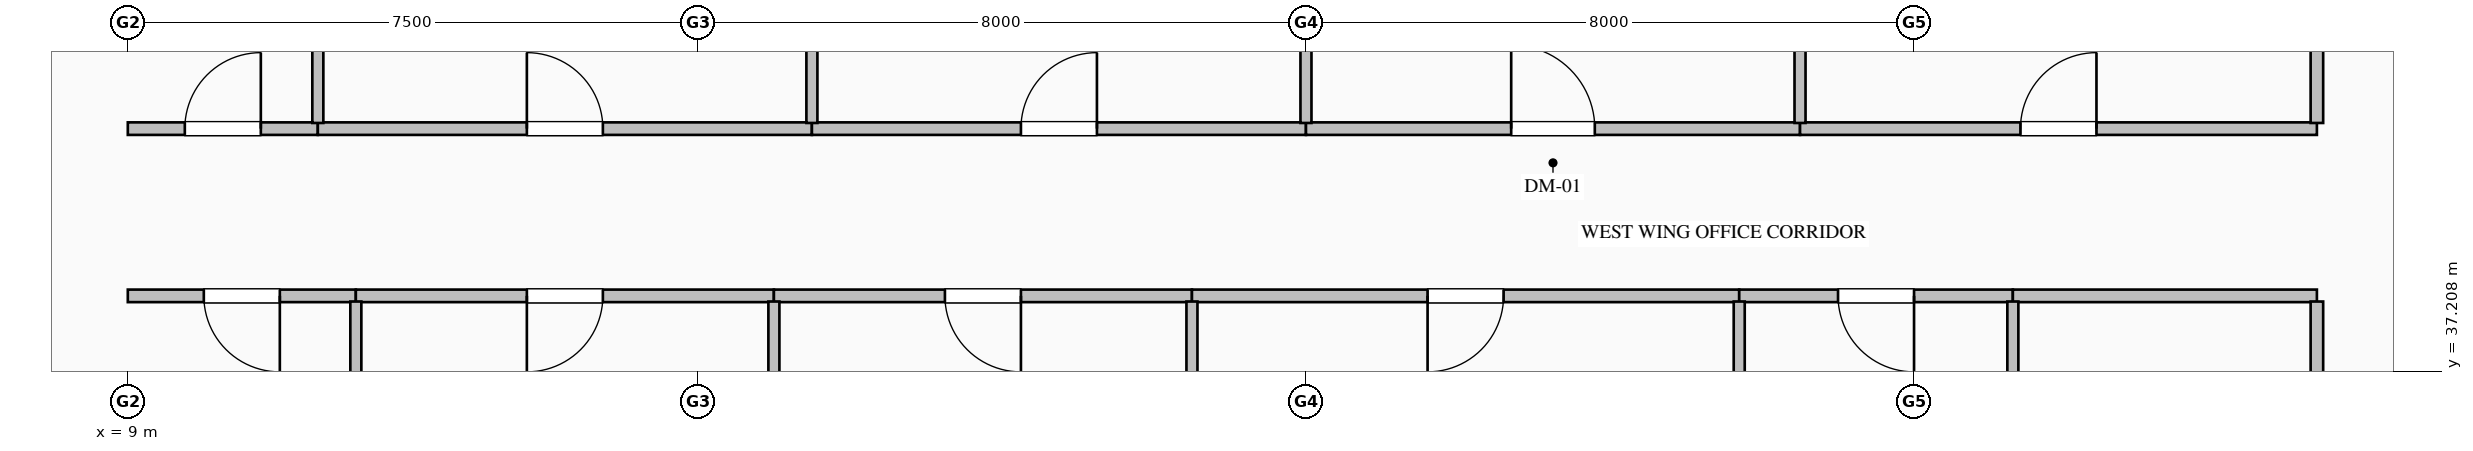
"""IFC4 building model, lengths in metres.
Left out: names, types, materials, properties, quantities, classifications, styles, units other than length and angle.
Written with IfcOpenShell. Run it as: python <this file> out.ifc"""

import sys

from ifc_helpers import new_model, si_unit, direction, frame, frame_2d, origin, place, context, subcontext, project, spatial, rectangle, extrude, element, fill, save


model = new_model("IFC4")
c1 = context("Model", 3, precision=1e-05, world=origin(), true_north=direction((0.0, 1.0)))
c2 = subcontext(c1, "Body", "Model", "MODEL_VIEW")
j1 = project(units=[si_unit("LENGTHUNIT", "METRE"), si_unit("PLANEANGLEUNIT", "RADIAN")], contexts=[c1])
p1 = place(None, origin())
s1 = spatial("IfcSite", under=j1, at=p1, CompositionType="ELEMENT")
p2 = place(p1, origin())
s2 = spatial("IfcBuilding", under=s1, at=p2, CompositionType="ELEMENT")
p3 = place(p2, frame((0.0, 0.0, 92.2)))
s3 = spatial("IfcBuildingStorey", under=s2, at=p3, CompositionType="ELEMENT", Elevation=92.2)
p4 = place(p3, frame((9.0, 40.4, 0.0), z_axis=(0.0, 0.0, 1.0), x_axis=(1.0, 0.0, 0.0)))
e1 = element("IfcWall", 1, at=p4, inside=s3, PredefinedType="PARTITIONING", context=c2, shape_type="SweptSolid", body=[
    extrude(rectangle(XDim=2.5, YDim=0.165, at=frame_2d((1.25, 0.0))), origin(), (0.0, 0.0, 1.0), 3.75),
])
p5 = place(p4, frame((0.75, 0.0, 0.0)))
e2 = element("IfcOpeningElement", 2, at=p5, cuts=e1, PredefinedType="OPENING", context=c2, shape_type="SweptSolid", body=[
    extrude(rectangle(XDim=1.0, YDim=2.15, at=frame_2d((0.5, 1.075))), frame((0.0, 0.093, 0.0), z_axis=(0.0, -1.0, 0.0), x_axis=(1.0, 0.0, 0.0)), (0.0, 0.0, 1.0), 0.185),
])
p6 = place(p3, frame((11.5, 40.4, 0.0), z_axis=(0.0, 0.0, 1.0), x_axis=(1.0, 0.0, 0.0)))
e3 = element("IfcWall", 3, at=p6, inside=s3, PredefinedType="PARTITIONING", context=c2, shape_type="SweptSolid", body=[
    extrude(rectangle(XDim=6.5, YDim=0.165, at=frame_2d((3.25, 0.0))), origin(), (0.0, 0.0, 1.0), 3.75),
])
p7 = place(p6, frame((2.75, 0.0, 0.0)))
e4 = element("IfcOpeningElement", 4, at=p7, cuts=e3, PredefinedType="OPENING", context=c2, shape_type="SweptSolid", body=[
    extrude(rectangle(XDim=1.0, YDim=2.15, at=frame_2d((0.5, 1.075))), frame((0.0, 0.093, 0.0), z_axis=(0.0, -1.0, 0.0), x_axis=(1.0, 0.0, 0.0)), (0.0, 0.0, 1.0), 0.185),
])
p8 = place(p3, frame((18.0, 40.4, 0.0), z_axis=(0.0, 0.0, 1.0), x_axis=(1.0, 0.0, 0.0)))
e5 = element("IfcWall", 5, at=p8, inside=s3, PredefinedType="PARTITIONING", context=c2, shape_type="SweptSolid", body=[
    extrude(rectangle(XDim=6.5, YDim=0.165, at=frame_2d((3.25, 0.0))), origin(), (0.0, 0.0, 1.0), 3.75),
])
p9 = place(p8, frame((2.75, 0.0, 0.0)))
e6 = element("IfcOpeningElement", 6, at=p9, cuts=e5, PredefinedType="OPENING", context=c2, shape_type="SweptSolid", body=[
    extrude(rectangle(XDim=1.0, YDim=2.15, at=frame_2d((0.5, 1.075))), frame((0.0, 0.093, 0.0), z_axis=(0.0, -1.0, 0.0), x_axis=(1.0, 0.0, 0.0)), (0.0, 0.0, 1.0), 0.185),
])
p10 = place(p3, frame((24.5, 40.4, 0.0), z_axis=(0.0, 0.0, 1.0), x_axis=(1.0, 0.0, 0.0)))
e7 = element("IfcWall", 7, at=p10, inside=s3, PredefinedType="PARTITIONING", context=c2, shape_type="SweptSolid", body=[
    extrude(rectangle(XDim=6.5, YDim=0.165, at=frame_2d((3.25, 0.0))), origin(), (0.0, 0.0, 1.0), 3.75),
])
p11 = place(p10, frame((2.7, 0.0, 0.0)))
e8 = element("IfcOpeningElement", 8, at=p11, cuts=e7, PredefinedType="OPENING", context=c2, shape_type="SweptSolid", body=[
    extrude(rectangle(XDim=1.1, YDim=2.2, at=frame_2d((0.55, 1.1))), frame((0.0, 0.093, 0.0), z_axis=(0.0, -1.0, 0.0), x_axis=(1.0, 0.0, 0.0)), (0.0, 0.0, 1.0), 0.185),
])
p12 = place(p3, frame((31.0, 40.4, 0.0), z_axis=(0.0, 0.0, 1.0), x_axis=(1.0, 0.0, 0.0)))
e9 = element("IfcWall", 9, at=p12, inside=s3, PredefinedType="PARTITIONING", context=c2, shape_type="SweptSolid", body=[
    extrude(rectangle(XDim=6.8, YDim=0.165, at=frame_2d((3.4, 0.0))), origin(), (0.0, 0.0, 1.0), 3.75),
])
p13 = place(p12, frame((2.9, 0.0, 0.0)))
e10 = element("IfcOpeningElement", 10, at=p13, cuts=e9, PredefinedType="OPENING", context=c2, shape_type="SweptSolid", body=[
    extrude(rectangle(XDim=1.0, YDim=2.15, at=frame_2d((0.5, 1.075))), frame((0.0, 0.093, 0.0), z_axis=(0.0, -1.0, 0.0), x_axis=(1.0, 0.0, 0.0)), (0.0, 0.0, 1.0), 0.185),
])
p14 = place(p3, frame((12.0, 38.2, 0.0), z_axis=(0.0, 0.0, 1.0), x_axis=(-1.0, 0.0, 0.0)))
e11 = element("IfcWall", 11, at=p14, inside=s3, PredefinedType="PARTITIONING", context=c2, shape_type="SweptSolid", body=[
    extrude(rectangle(XDim=3.0, YDim=0.165, at=frame_2d((1.5, 0.0))), origin(), (0.0, 0.0, 1.0), 3.75),
])
p15 = place(p14, frame((1.0, 0.0, 0.0)))
e12 = element("IfcOpeningElement", 12, at=p15, cuts=e11, PredefinedType="OPENING", context=c2, shape_type="SweptSolid", body=[
    extrude(rectangle(XDim=1.0, YDim=2.15, at=frame_2d((0.5, 1.075))), frame((0.0, 0.093, 0.0), z_axis=(0.0, -1.0, 0.0), x_axis=(1.0, 0.0, 0.0)), (0.0, 0.0, 1.0), 0.185),
])
p16 = place(p3, frame((17.5, 38.2, 0.0), z_axis=(0.0, 0.0, 1.0), x_axis=(-1.0, 0.0, 0.0)))
e13 = element("IfcWall", 13, at=p16, inside=s3, PredefinedType="PARTITIONING", context=c2, shape_type="SweptSolid", body=[
    extrude(rectangle(XDim=5.5, YDim=0.165, at=frame_2d((2.75, 0.0))), origin(), (0.0, 0.0, 1.0), 3.75),
])
p17 = place(p16, frame((2.25, 0.0, 0.0)))
e14 = element("IfcOpeningElement", 14, at=p17, cuts=e13, PredefinedType="OPENING", context=c2, shape_type="SweptSolid", body=[
    extrude(rectangle(XDim=1.0, YDim=2.15, at=frame_2d((0.5, 1.075))), frame((0.0, 0.093, 0.0), z_axis=(0.0, -1.0, 0.0), x_axis=(1.0, 0.0, 0.0)), (0.0, 0.0, 1.0), 0.185),
])
p18 = place(p3, frame((23.0, 38.2, 0.0), z_axis=(0.0, 0.0, 1.0), x_axis=(-1.0, 0.0, 0.0)))
e15 = element("IfcWall", 15, at=p18, inside=s3, PredefinedType="PARTITIONING", context=c2, shape_type="SweptSolid", body=[
    extrude(rectangle(XDim=5.5, YDim=0.165, at=frame_2d((2.75, 0.0))), origin(), (0.0, 0.0, 1.0), 3.75),
])
p19 = place(p18, frame((2.25, 0.0, 0.0)))
e16 = element("IfcOpeningElement", 16, at=p19, cuts=e15, PredefinedType="OPENING", context=c2, shape_type="SweptSolid", body=[
    extrude(rectangle(XDim=1.0, YDim=2.15, at=frame_2d((0.5, 1.075))), frame((0.0, 0.093, 0.0), z_axis=(0.0, -1.0, 0.0), x_axis=(1.0, 0.0, 0.0)), (0.0, 0.0, 1.0), 0.185),
])
p20 = place(p3, frame((30.2, 38.2, 0.0), z_axis=(0.0, 0.0, 1.0), x_axis=(-1.0, 0.0, 0.0)))
e17 = element("IfcWall", 17, at=p20, inside=s3, PredefinedType="PARTITIONING", context=c2, shape_type="SweptSolid", body=[
    extrude(rectangle(XDim=7.2, YDim=0.165, at=frame_2d((3.6, 0.0))), origin(), (0.0, 0.0, 1.0), 3.75),
])
p21 = place(p20, frame((3.1, 0.0, 0.0)))
e18 = element("IfcOpeningElement", 18, at=p21, cuts=e17, PredefinedType="OPENING", context=c2, shape_type="SweptSolid", body=[
    extrude(rectangle(XDim=1.0, YDim=2.15, at=frame_2d((0.5, 1.075))), frame((0.0, 0.093, 0.0), z_axis=(0.0, -1.0, 0.0), x_axis=(1.0, 0.0, 0.0)), (0.0, 0.0, 1.0), 0.185),
])
p22 = place(p3, frame((33.8, 38.2, 0.0), z_axis=(0.0, 0.0, 1.0), x_axis=(-1.0, 0.0, 0.0)))
e19 = element("IfcWall", 19, at=p22, inside=s3, PredefinedType="PARTITIONING", context=c2, shape_type="SweptSolid", body=[
    extrude(rectangle(XDim=3.6, YDim=0.165, at=frame_2d((1.8, 0.0))), origin(), (0.0, 0.0, 1.0), 3.75),
])
p23 = place(p22, frame((1.3, 0.0, 0.0)))
e20 = element("IfcOpeningElement", 20, at=p23, cuts=e19, PredefinedType="OPENING", context=c2, shape_type="SweptSolid", body=[
    extrude(rectangle(XDim=1.0, YDim=2.15, at=frame_2d((0.5, 1.075))), frame((0.0, 0.093, 0.0), z_axis=(0.0, -1.0, 0.0), x_axis=(1.0, 0.0, 0.0)), (0.0, 0.0, 1.0), 0.185),
])
p24 = place(p3, frame((37.8, 38.2, 0.0), z_axis=(0.0, 0.0, 1.0), x_axis=(-1.0, 0.0, 0.0)))
e21 = element("IfcWall", 21, at=p24, inside=s3, PredefinedType="PARTITIONING", context=c2, shape_type="SweptSolid", body=[
    extrude(rectangle(XDim=4.0, YDim=0.165, at=frame_2d((2.0, 0.0))), origin(), (0.0, 0.0, 1.0), 3.75),
])
p25 = place(p3, frame((37.8, 40.475, 0.0), z_axis=(0.0, 0.0, 1.0), x_axis=(0.0, 1.0, 0.0)))
e22 = element("IfcWall", 22, at=p25, inside=s3, PredefinedType="PARTITIONING", context=c2, shape_type="SweptSolid", body=[
    extrude(rectangle(XDim=3.651, YDim=0.165, at=frame_2d((1.825, 0.0))), origin(), (0.0, 0.0, 1.0), 3.75),
])
p26 = place(p3, frame((37.8, 31.6, 0.0), z_axis=(0.0, 0.0, 1.0), x_axis=(0.0, 1.0, 0.0)))
e23 = element("IfcWall", 23, at=p26, inside=s3, PredefinedType="PARTITIONING", context=c2, shape_type="SweptSolid", body=[
    extrude(rectangle(XDim=6.525, YDim=0.165, at=frame_2d((3.263, 0.0))), origin(), (0.0, 0.0, 1.0), 3.75),
])
p27 = place(p26, frame((2.763, 0.0, 0.0)))
e24 = element("IfcOpeningElement", 24, at=p27, cuts=e23, PredefinedType="OPENING", context=c2, shape_type="SweptSolid", body=[
    extrude(rectangle(XDim=1.0, YDim=2.15, at=frame_2d((0.5, 1.075))), frame((0.0, 0.093, 0.0), z_axis=(0.0, -1.0, 0.0), x_axis=(1.0, 0.0, 0.0)), (0.0, 0.0, 1.0), 0.185),
])
for number, where, z_axis, x_axis in (
    (25, (11.5, 51.648, 0.0), (0.0, 0.0, 1.0), (0.0, -1.0, 0.0)),
    (26, (18.0, 51.648, 0.0), (0.0, 0.0, 1.0), (0.0, -1.0, 0.0)),
):
    element("IfcWall", number, at=place(p3, frame(where, z_axis=z_axis, x_axis=x_axis)), inside=s3, PredefinedType="PARTITIONING", context=c2, shape_type="SweptSolid", body=[
        extrude(rectangle(XDim=11.173, YDim=0.145, at=frame_2d((5.587, 0.0))), origin(), (0.0, 0.0, 1.0), 3.75),
    ])
p28 = place(p3, frame((24.5, 51.648, 0.0), z_axis=(0.0, 0.0, 1.0), x_axis=(0.0, -1.0, 0.0)))
e27 = element("IfcWall", 27, at=p28, inside=s3, PredefinedType="PARTITIONING", context=c2, shape_type="SweptSolid", body=[
    extrude(rectangle(XDim=11.173, YDim=0.145, at=frame_2d((5.587, 0.0))), origin(), (0.0, 0.0, 1.0), 3.042),
])
p29 = place(p3, frame((31.0, 51.648, 0.0), z_axis=(0.0, 0.0, 1.0), x_axis=(0.0, -1.0, 0.0)))
e28 = element("IfcWall", 28, at=p29, inside=s3, PredefinedType="PARTITIONING", context=c2, shape_type="SweptSolid", body=[
    extrude(rectangle(XDim=11.173, YDim=0.145, at=frame_2d((5.587, 0.0))), origin(), (0.0, 0.0, 1.0), 3.75),
])
for number, where, z_axis, x_axis in (
    (29, (12.0, 38.125, 0.0), (0.0, 0.0, 1.0), (0.0, -1.0, 0.0)),
    (30, (17.5, 38.125, 0.0), (0.0, 0.0, 1.0), (0.0, -1.0, 0.0)),
    (31, (23.0, 38.125, 0.0), (0.0, 0.0, 1.0), (0.0, -1.0, 0.0)),
    (32, (30.2, 38.125, 0.0), (0.0, 0.0, 1.0), (0.0, -1.0, 0.0)),
    (33, (33.8, 38.125, 0.0), (0.0, 0.0, 1.0), (0.0, -1.0, 0.0)),
):
    element("IfcWall", number, at=place(p3, frame(where, z_axis=z_axis, x_axis=x_axis)), inside=s3, PredefinedType="PARTITIONING", context=c2, shape_type="SweptSolid", body=[
        extrude(rectangle(XDim=9.773, YDim=0.145, at=frame_2d((4.887, 0.0))), origin(), (0.0, 0.0, 1.0), 3.75),
    ])
p30 = place(p5, origin())
e34 = element("IfcDoor", 34, at=p30, inside=s3, OperationType="SINGLE_SWING_RIGHT", PredefinedType="DOOR", context=c2, shape_type="SweptSolid", body=[
    extrude(rectangle(XDim=1.0, YDim=2.15, at=frame_2d((0.5, 1.075))), frame((0.0, 0.025, 0.0), z_axis=(0.0, -1.0, 0.0), x_axis=(1.0, 0.0, 0.0)), (0.0, 0.0, 1.0), 0.05),
])
fill(e2, e34)
p31 = place(p7, origin())
e35 = element("IfcDoor", 35, at=p31, inside=s3, OperationType="SINGLE_SWING_LEFT", PredefinedType="DOOR", context=c2, shape_type="SweptSolid", body=[
    extrude(rectangle(XDim=1.0, YDim=2.15, at=frame_2d((0.5, 1.075))), frame((0.0, 0.025, 0.0), z_axis=(0.0, -1.0, 0.0), x_axis=(1.0, 0.0, 0.0)), (0.0, 0.0, 1.0), 0.05),
])
fill(e4, e35)
p32 = place(p9, origin())
e36 = element("IfcDoor", 36, at=p32, inside=s3, OperationType="SINGLE_SWING_RIGHT", PredefinedType="DOOR", context=c2, shape_type="SweptSolid", body=[
    extrude(rectangle(XDim=1.0, YDim=2.15, at=frame_2d((0.5, 1.075))), frame((0.0, 0.025, 0.0), z_axis=(0.0, -1.0, 0.0), x_axis=(1.0, 0.0, 0.0)), (0.0, 0.0, 1.0), 0.05),
])
fill(e6, e36)
p33 = place(p11, origin())
e37 = element("IfcDoor", 37, at=p33, inside=s3, OperationType="SINGLE_SWING_LEFT", PredefinedType="DOOR", context=c2, shape_type="SweptSolid", body=[
    extrude(rectangle(XDim=1.1, YDim=2.2, at=frame_2d((0.55, 1.1))), frame((0.0, 0.025, 0.0), z_axis=(0.0, -1.0, 0.0), x_axis=(1.0, 0.0, 0.0)), (0.0, 0.0, 1.0), 0.05),
])
fill(e8, e37)
p34 = place(p13, origin())
e38 = element("IfcDoor", 38, at=p34, inside=s3, OperationType="SINGLE_SWING_RIGHT", PredefinedType="DOOR", context=c2, shape_type="SweptSolid", body=[
    extrude(rectangle(XDim=1.0, YDim=2.15, at=frame_2d((0.5, 1.075))), frame((0.0, 0.025, 0.0), z_axis=(0.0, -1.0, 0.0), x_axis=(1.0, 0.0, 0.0)), (0.0, 0.0, 1.0), 0.05),
])
fill(e10, e38)
p35 = place(p15, origin())
e39 = element("IfcDoor", 39, at=p35, inside=s3, OperationType="SINGLE_SWING_LEFT", PredefinedType="DOOR", context=c2, shape_type="SweptSolid", body=[
    extrude(rectangle(XDim=1.0, YDim=2.15, at=frame_2d((0.5, 1.075))), frame((0.0, 0.025, 0.0), z_axis=(0.0, -1.0, 0.0), x_axis=(1.0, 0.0, 0.0)), (0.0, 0.0, 1.0), 0.05),
])
fill(e12, e39)
p36 = place(p17, origin())
e40 = element("IfcDoor", 40, at=p36, inside=s3, OperationType="SINGLE_SWING_RIGHT", PredefinedType="DOOR", context=c2, shape_type="SweptSolid", body=[
    extrude(rectangle(XDim=1.0, YDim=2.15, at=frame_2d((0.5, 1.075))), frame((0.0, 0.025, 0.0), z_axis=(0.0, -1.0, 0.0), x_axis=(1.0, 0.0, 0.0)), (0.0, 0.0, 1.0), 0.05),
])
fill(e14, e40)
p37 = place(p19, origin())
e41 = element("IfcDoor", 41, at=p37, inside=s3, OperationType="SINGLE_SWING_LEFT", PredefinedType="DOOR", context=c2, shape_type="SweptSolid", body=[
    extrude(rectangle(XDim=1.0, YDim=2.15, at=frame_2d((0.5, 1.075))), frame((0.0, 0.025, 0.0), z_axis=(0.0, -1.0, 0.0), x_axis=(1.0, 0.0, 0.0)), (0.0, 0.0, 1.0), 0.05),
])
fill(e16, e41)
p38 = place(p21, origin())
e42 = element("IfcDoor", 42, at=p38, inside=s3, OperationType="SINGLE_SWING_RIGHT", PredefinedType="DOOR", context=c2, shape_type="SweptSolid", body=[
    extrude(rectangle(XDim=1.0, YDim=2.15, at=frame_2d((0.5, 1.075))), frame((0.0, 0.025, 0.0), z_axis=(0.0, -1.0, 0.0), x_axis=(1.0, 0.0, 0.0)), (0.0, 0.0, 1.0), 0.05),
])
fill(e18, e42)
p39 = place(p23, origin())
e43 = element("IfcDoor", 43, at=p39, inside=s3, OperationType="SINGLE_SWING_LEFT", PredefinedType="DOOR", context=c2, shape_type="SweptSolid", body=[
    extrude(rectangle(XDim=1.0, YDim=2.15, at=frame_2d((0.5, 1.075))), frame((0.0, 0.025, 0.0), z_axis=(0.0, -1.0, 0.0), x_axis=(1.0, 0.0, 0.0)), (0.0, 0.0, 1.0), 0.05),
])
fill(e20, e43)
save(model, sys.argv[1])
